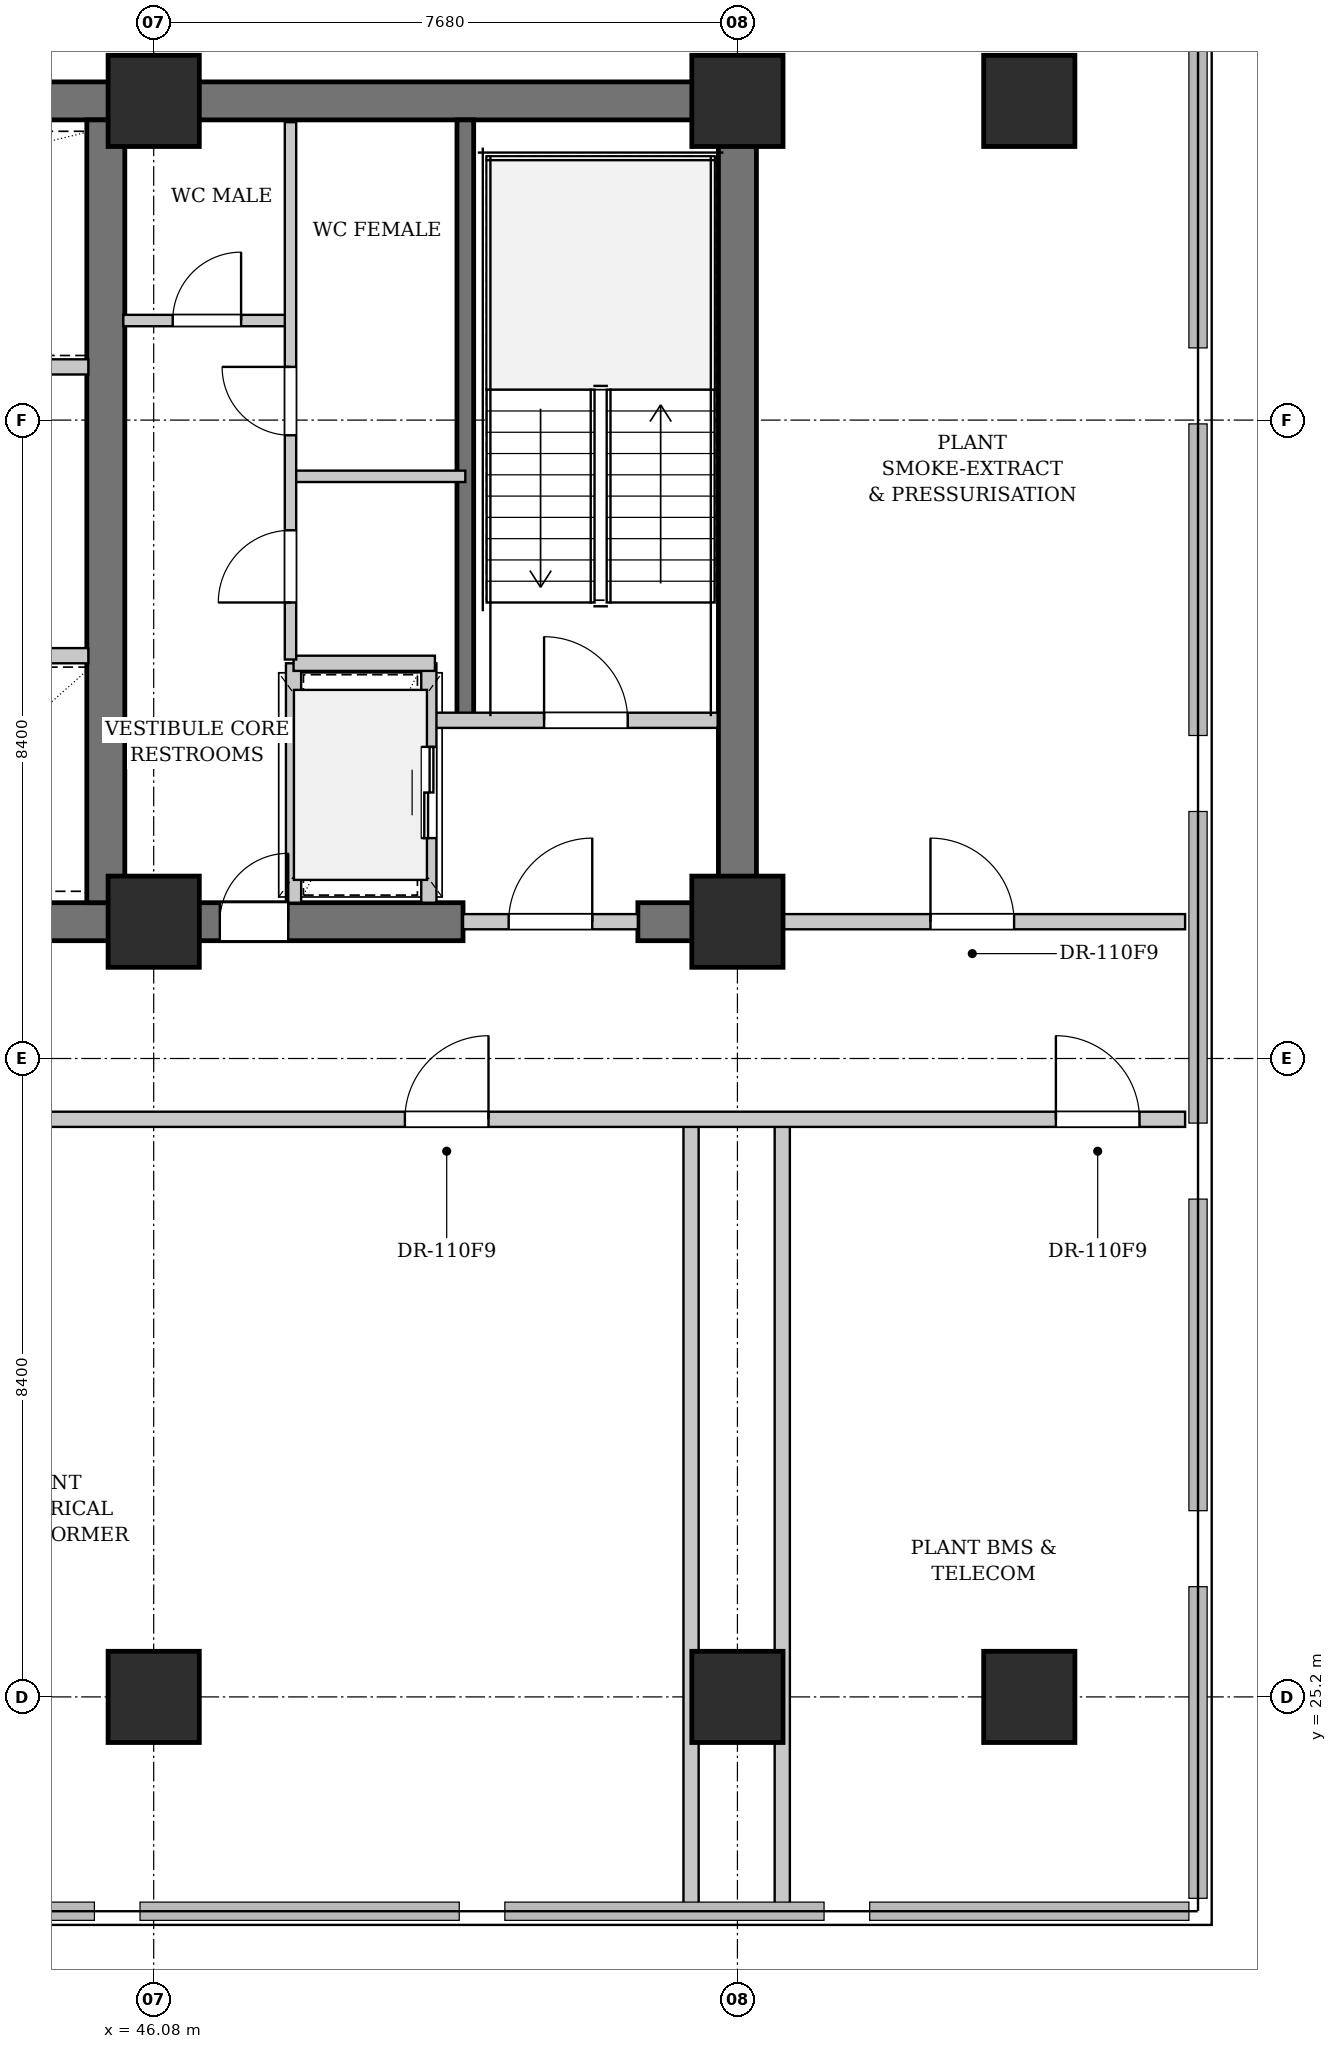
"""IFC4 building model, lengths in metres.
Left out: names, types, materials, properties, quantities, classifications, styles, units other than length and angle.
Written with IfcOpenShell. Run it as: python <this file> out.ifc"""

import sys

from ifc_helpers import new_model, si_unit, direction, frame, frame_2d, origin, origin_2d, place, context, subcontext, project, spatial, rectangle, extrude, element, fill, save


model = new_model("IFC4")
c1 = context("Model", 3, precision=1e-05, world=origin(), true_north=direction((0.0, 1.0)))
c2 = subcontext(c1, "Body", "Model", "MODEL_VIEW")
j1 = project(units=[si_unit("LENGTHUNIT", "METRE"), si_unit("PLANEANGLEUNIT", "RADIAN")], contexts=[c1])
p1 = place(None, origin())
s1 = spatial("IfcSite", under=j1, at=p1, CompositionType="ELEMENT")
p2 = place(p1, origin())
s2 = spatial("IfcBuilding", under=s1, at=p2, CompositionType="ELEMENT")
p3 = place(p2, frame((0.0, 0.0, 81.9)))
s3 = spatial("IfcBuildingStorey", under=s2, at=p3, CompositionType="ELEMENT", Elevation=81.9)
p4 = place(p3, frame((22.79, 46.2, 0.0), z_axis=(0.0, 0.0, 1.0), x_axis=(1.0, 0.0, 0.0)))
e1 = element("IfcWall", 1, at=p4, inside=s3, PredefinedType="SHEAR", context=c2, shape_type="SweptSolid", body=[
    extrude(rectangle(XDim=31.22, YDim=0.5, at=frame_2d((15.61, 0.0))), origin(), (0.0, 0.0, 1.0), 3.48),
])
p5 = place(p3, frame((42.1, 35.4, 0.0), z_axis=(0.0, 0.0, 1.0), x_axis=(1.0, 0.0, 0.0)))
e2 = element("IfcWall", 2, at=p5, inside=s3, PredefinedType="SHEAR", context=c2, shape_type="SweptSolid", body=[
    extrude(rectangle(XDim=8.05, YDim=0.5, at=frame_2d((4.025, 0.0))), origin(), (0.0, 0.0, 1.0), 3.48),
])
p6 = place(p5, frame((4.85, 0.0, 0.0)))
e3 = element("IfcOpeningElement", 3, at=p6, cuts=e2, PredefinedType="OPENING", context=c2, shape_type="SweptSolid", body=[
    extrude(rectangle(XDim=0.9, YDim=2.15, at=frame_2d((0.45, 1.075))), frame((0.0, 0.26, 0.0), z_axis=(0.0, -1.0, 0.0), x_axis=(1.0, 0.0, 0.0)), (0.0, 0.0, 1.0), 0.52),
])
p7 = place(p3, frame((52.45, 35.4, 0.0), z_axis=(0.0, 0.0, 1.0), x_axis=(1.0, 0.0, 0.0)))
e4 = element("IfcWall", 4, at=p7, inside=s3, PredefinedType="SHEAR", context=c2, shape_type="SweptSolid", body=[
    extrude(rectangle(XDim=1.56, YDim=0.5, at=frame_2d((0.78, 0.0))), origin(), (0.0, 0.0, 1.0), 3.48),
])
for number, where, z_axis, x_axis in (
    (5, (45.45, 35.65, 0.0), (0.0, 0.0, 1.0), (0.0, 1.0, 0.0)),
    (6, (53.76, 35.65, 0.0), (0.0, 0.0, 1.0), (0.0, 1.0, 0.0)),
):
    element("IfcWall", number, at=place(p3, frame(where, z_axis=z_axis, x_axis=x_axis)), inside=s3, PredefinedType="SHEAR", context=c2, shape_type="SweptSolid", body=[
        extrude(rectangle(XDim=10.3, YDim=0.5, at=frame_2d((5.15, 0.0))), origin(), (0.0, 0.0, 1.0), 3.48),
    ])
p8 = place(p3, frame((50.18, 38.05, 0.0), z_axis=(0.0, 0.0, 1.0), x_axis=(0.0, 1.0, 0.0)))
e7 = element("IfcWall", 7, at=p8, inside=s3, PredefinedType="SHEAR", context=c2, shape_type="SweptSolid", body=[
    extrude(rectangle(XDim=7.9, YDim=0.22, at=frame_2d((3.95, 0.0))), origin(), (0.0, 0.0, 1.0), 3.48),
])
for number, where, z_axis, x_axis in (
    (8, (46.08, 35.4, 0.0), (0.0, 0.0, 1.0), (1.0, 0.0, 0.0)),
    (9, (46.08, 46.2, 0.0), (0.0, 0.0, 1.0), (1.0, 0.0, 0.0)),
    (10, (46.08, 25.2, 0.0), (0.0, 0.0, 1.0), (1.0, 0.0, 0.0)),
    (11, (53.76, 35.4, 0.0), (0.0, 0.0, 1.0), (1.0, 0.0, 0.0)),
    (12, (53.76, 46.2, 0.0), (0.0, 0.0, 1.0), (1.0, 0.0, 0.0)),
    (13, (53.76, 25.2, 0.0), (0.0, 0.0, 1.0), (1.0, 0.0, 0.0)),
    (14, (57.6, 25.2, 0.0), (0.0, 0.0, 1.0), (1.0, 0.0, 0.0)),
    (15, (57.6, 46.2, 0.0), (0.0, 0.0, 1.0), (1.0, 0.0, 0.0)),
):
    element("IfcColumn", number, at=place(p3, frame(where, z_axis=z_axis, x_axis=x_axis)), inside=s3, PredefinedType="COLUMN", context=c2, shape_type="SweptSolid", body=[
        extrude(rectangle(XDim=1.2, YDim=1.2, at=origin_2d()), origin(), (0.0, 0.0, 1.0), 3.9),
    ])
for number, where, z_axis, x_axis in (
    (16, (41.85, 38.9, 0.0), (0.0, 0.0, 1.0), (1.0, 0.0, 0.0)),
    (17, (41.85, 42.7, 0.0), (0.0, 0.0, 1.0), (1.0, 0.0, 0.0)),
):
    element("IfcWall", number, at=place(p3, frame(where, z_axis=z_axis, x_axis=x_axis)), inside=s3, PredefinedType="PARTITIONING", context=c2, shape_type="SweptSolid", body=[
        extrude(rectangle(XDim=3.37, YDim=0.2, at=frame_2d((1.685, 0.0))), origin(), (0.0, 0.0, 1.0), 3.48),
    ])
p9 = place(p3, frame((49.78, 38.05, 0.0), z_axis=(0.0, 0.0, 1.0), x_axis=(1.0, 0.0, 0.0)))
e18 = element("IfcWall", 18, at=p9, inside=s3, PredefinedType="PARTITIONING", context=c2, shape_type="SweptSolid", body=[
    extrude(rectangle(XDim=3.72, YDim=0.2, at=frame_2d((1.86, 0.0))), origin(), (0.0, 0.0, 1.0), 3.48),
])
p10 = place(p9, frame((1.436, 0.0, 0.0)))
e19 = element("IfcOpeningElement", 19, at=p10, cuts=e18, PredefinedType="OPENING", context=c2, shape_type="SweptSolid", body=[
    extrude(rectangle(XDim=1.1, YDim=2.15, at=frame_2d((0.55, 1.075))), frame((0.0, 0.11, 0.0), z_axis=(0.0, -1.0, 0.0), x_axis=(1.0, 0.0, 0.0)), (0.0, 0.0, 1.0), 0.22),
])
p11 = place(p3, frame((50.15, 35.4, 0.0), z_axis=(0.0, 0.0, 1.0), x_axis=(1.0, 0.0, 0.0)))
e20 = element("IfcWall", 20, at=p11, inside=s3, PredefinedType="PARTITIONING", context=c2, shape_type="SweptSolid", body=[
    extrude(rectangle(XDim=2.3, YDim=0.2, at=frame_2d((1.15, 0.0))), origin(), (0.0, 0.0, 1.0), 2.565),
])
p12 = place(p11, frame((0.6, 0.0, 0.0)))
e21 = element("IfcOpeningElement", 21, at=p12, cuts=e20, PredefinedType="OPENING", context=c2, shape_type="SweptSolid", body=[
    extrude(rectangle(XDim=1.1, YDim=2.15, at=frame_2d((0.55, 1.075))), frame((0.0, 0.11, 0.0), z_axis=(0.0, -1.0, 0.0), x_axis=(1.0, 0.0, 0.0)), (0.0, 0.0, 1.0), 0.22),
])
p13 = place(p3, frame((49.7, 35.65, 0.0), z_axis=(0.0, 0.0, 1.0), x_axis=(0.0, 1.0, 0.0)))
e22 = element("IfcWall", 22, at=p13, inside=s3, PredefinedType="PARTITIONING", context=c2, shape_type="SweptSolid", body=[
    extrude(rectangle(XDim=3.15, YDim=0.2, at=frame_2d((1.575, 0.0))), origin(), (0.0, 0.0, 1.0), 3.48),
])
p14 = place(p13, frame((0.85, 0.0, 0.0)))
e23 = element("IfcOpeningElement", 23, at=p14, cuts=e22, PredefinedType="OPENING", context=c2, shape_type="SweptSolid", body=[
    extrude(rectangle(XDim=1.2, YDim=2.2, at=frame_2d((0.6, 1.1))), frame((0.0, 0.11, 0.0), z_axis=(0.0, -1.0, 0.0), x_axis=(1.0, 0.0, 0.0)), (0.0, 0.0, 1.0), 0.22),
])
p15 = place(p3, frame((47.92, 35.65, 0.0), z_axis=(0.0, 0.0, 1.0), x_axis=(0.0, 1.0, 0.0)))
e24 = element("IfcWall", 24, at=p15, inside=s3, PredefinedType="PARTITIONING", context=c2, shape_type="SweptSolid", body=[
    extrude(rectangle(XDim=3.15, YDim=0.2, at=frame_2d((1.575, 0.0))), origin(), (0.0, 0.0, 1.0), 3.48),
])
p16 = place(p3, frame((47.92, 38.8, 0.0), z_axis=(0.0, 0.0, 1.0), x_axis=(1.0, 0.0, 0.0)))
e25 = element("IfcWall", 25, at=p16, inside=s3, PredefinedType="PARTITIONING", context=c2, shape_type="SweptSolid", body=[
    extrude(rectangle(XDim=1.86, YDim=0.2, at=frame_2d((0.93, 0.0))), origin(), (0.0, 0.0, 1.0), 3.48),
])
p17 = place(p3, frame((45.68, 43.31, 0.0), z_axis=(0.0, 0.0, 1.0), x_axis=(1.0, 0.0, 0.0)))
e26 = element("IfcWall", 26, at=p17, inside=s3, PredefinedType="PARTITIONING", context=c2, shape_type="SweptSolid", body=[
    extrude(rectangle(XDim=2.2, YDim=0.15, at=frame_2d((1.1, 0.0))), origin(), (0.0, 0.0, 1.0), 3.48),
])
p18 = place(p17, frame((0.65, 0.0, 0.0)))
e27 = element("IfcOpeningElement", 27, at=p18, cuts=e26, PredefinedType="OPENING", context=c2, shape_type="SweptSolid", body=[
    extrude(rectangle(XDim=0.9, YDim=2.15, at=frame_2d((0.45, 1.075))), frame((0.0, 0.085, 0.0), z_axis=(0.0, -1.0, 0.0), x_axis=(1.0, 0.0, 0.0)), (0.0, 0.0, 1.0), 0.17),
])
p19 = place(p3, frame((47.88, 41.26, 0.0), z_axis=(0.0, 0.0, 1.0), x_axis=(1.0, 0.0, 0.0)))
e28 = element("IfcWall", 28, at=p19, inside=s3, PredefinedType="PARTITIONING", context=c2, shape_type="SweptSolid", body=[
    extrude(rectangle(XDim=2.3, YDim=0.15, at=frame_2d((1.15, 0.0))), origin(), (0.0, 0.0, 1.0), 3.48),
])
p20 = place(p3, frame((47.88, 38.85, 0.0), z_axis=(0.0, 0.0, 1.0), x_axis=(0.0, 1.0, 0.0)))
e29 = element("IfcWall", 29, at=p20, inside=s3, PredefinedType="PARTITIONING", context=c2, shape_type="SweptSolid", body=[
    extrude(rectangle(XDim=7.07, YDim=0.15, at=frame_2d((3.535, 0.0))), origin(), (0.0, 0.0, 1.0), 3.48),
])
p21 = place(p20, frame((0.75, 0.0, 0.0)))
e30 = element("IfcOpeningElement", 30, at=p21, cuts=e29, PredefinedType="OPENING", context=c2, shape_type="SweptSolid", body=[
    extrude(rectangle(XDim=0.95, YDim=2.15, at=frame_2d((0.475, 1.075))), frame((0.0, 0.085, 0.0), z_axis=(0.0, -1.0, 0.0), x_axis=(1.0, 0.0, 0.0)), (0.0, 0.0, 1.0), 0.17),
])
p22 = place(p20, frame((2.95, 0.0, 0.0)))
e31 = element("IfcOpeningElement", 31, at=p22, cuts=e29, PredefinedType="OPENING", context=c2, shape_type="SweptSolid", body=[
    extrude(rectangle(XDim=0.9, YDim=2.15, at=frame_2d((0.45, 1.075))), frame((0.0, 0.085, 0.0), z_axis=(0.0, -1.0, 0.0), x_axis=(1.0, 0.0, 0.0)), (0.0, 0.0, 1.0), 0.17),
])
p23 = place(p3, frame((54.05, 35.4, 0.0), z_axis=(0.0, 0.0, 1.0), x_axis=(1.0, 0.0, 0.0)))
e32 = element("IfcWall", 32, at=p23, inside=s3, PredefinedType="PARTITIONING", context=c2, shape_type="SweptSolid", body=[
    extrude(rectangle(XDim=5.6, YDim=0.2, at=frame_2d((2.8, 0.0))), origin(), (0.0, 0.0, 1.0), 3.48),
])
p24 = place(p23, frame((2.25, 0.0, 0.0)))
e33 = element("IfcOpeningElement", 33, at=p24, cuts=e32, PredefinedType="OPENING", context=c2, shape_type="SweptSolid", body=[
    extrude(rectangle(XDim=1.1, YDim=2.15, at=frame_2d((0.55, 1.075))), frame((0.0, 0.11, 0.0), z_axis=(0.0, -1.0, 0.0), x_axis=(1.0, 0.0, 0.0)), (0.0, 0.0, 1.0), 0.22),
])
for number, where, z_axis, x_axis in (
    (34, (53.15, 22.38, 0.0), (0.0, 0.0, 1.0), (0.0, 1.0, 0.0)),
    (35, (54.35, 22.38, 0.0), (0.0, 0.0, 1.0), (0.0, 1.0, 0.0)),
):
    element("IfcWall", number, at=place(p3, frame(where, z_axis=z_axis, x_axis=x_axis)), inside=s3, PredefinedType="PARTITIONING", context=c2, shape_type="SweptSolid", body=[
        extrude(rectangle(XDim=10.42, YDim=0.2, at=frame_2d((5.21, 0.0))), origin(), (0.0, 0.0, 1.0), 3.48),
    ])
p25 = place(p3, frame((17.15, 32.8, 0.0), z_axis=(0.0, 0.0, 1.0), x_axis=(1.0, 0.0, 0.0)))
e36 = element("IfcWall", 36, at=p25, inside=s3, PredefinedType="PARTITIONING", context=c2, shape_type="SweptSolid", body=[
    extrude(rectangle(XDim=42.5, YDim=0.2, at=frame_2d((21.25, 0.0))), origin(), (0.0, 0.0, 1.0), 3.48),
])
p26 = place(p25, frame((0.6, 0.0, 0.0)))
e37 = element("IfcOpeningElement", 37, at=p26, cuts=e36, PredefinedType="OPENING", context=c2, shape_type="SweptSolid", body=[
    extrude(rectangle(XDim=1.1, YDim=2.15, at=frame_2d((0.55, 1.075))), frame((0.0, 0.11, 0.0), z_axis=(0.0, -1.0, 0.0), x_axis=(1.0, 0.0, 0.0)), (0.0, 0.0, 1.0), 0.22),
])
p27 = place(p25, frame((16.862, 0.0, 0.0)))
e38 = element("IfcOpeningElement", 38, at=p27, cuts=e36, PredefinedType="OPENING", context=c2, shape_type="SweptSolid", body=[
    extrude(rectangle(XDim=1.1, YDim=2.15, at=frame_2d((0.55, 1.075))), frame((0.0, 0.11, 0.0), z_axis=(0.0, -1.0, 0.0), x_axis=(1.0, 0.0, 0.0)), (0.0, 0.0, 1.0), 0.22),
])
p28 = place(p25, frame((32.235, 0.0, 0.0)))
e39 = element("IfcOpeningElement", 39, at=p28, cuts=e36, PredefinedType="OPENING", context=c2, shape_type="SweptSolid", body=[
    extrude(rectangle(XDim=1.1, YDim=2.15, at=frame_2d((0.55, 1.075))), frame((0.0, 0.11, 0.0), z_axis=(0.0, -1.0, 0.0), x_axis=(1.0, 0.0, 0.0)), (0.0, 0.0, 1.0), 0.22),
])
p29 = place(p25, frame((40.8, 0.0, 0.0)))
e40 = element("IfcOpeningElement", 40, at=p29, cuts=e36, PredefinedType="OPENING", context=c2, shape_type="SweptSolid", body=[
    extrude(rectangle(XDim=1.1, YDim=2.15, at=frame_2d((0.55, 1.075))), frame((0.0, 0.11, 0.0), z_axis=(0.0, -1.0, 0.0), x_axis=(1.0, 0.0, 0.0)), (0.0, 0.0, 1.0), 0.22),
])
p30 = place(p10, origin())
e41 = element("IfcDoor", 41, at=p30, inside=s3, OperationType="SINGLE_SWING_LEFT", PredefinedType="DOOR", context=c2, shape_type="SweptSolid", body=[
    extrude(rectangle(XDim=1.1, YDim=2.15, at=frame_2d((0.55, 1.075))), frame((0.0, 0.025, 0.0), z_axis=(0.0, -1.0, 0.0), x_axis=(1.0, 0.0, 0.0)), (0.0, 0.0, 1.0), 0.05),
])
fill(e19, e41)
p31 = place(p12, origin())
e42 = element("IfcDoor", 42, at=p31, inside=s3, OperationType="SINGLE_SWING_RIGHT", PredefinedType="DOOR", context=c2, shape_type="SweptSolid", body=[
    extrude(rectangle(XDim=1.1, YDim=2.15, at=frame_2d((0.55, 1.075))), frame((0.0, 0.025, 0.0), z_axis=(0.0, -1.0, 0.0), x_axis=(1.0, 0.0, 0.0)), (0.0, 0.0, 1.0), 0.05),
])
fill(e21, e42)
p32 = place(p14, origin())
e43 = element("IfcDoor", 43, at=p32, inside=s3, OperationType="DOUBLE_DOOR_SLIDING", PredefinedType="DOOR", context=c2, shape_type="SweptSolid", body=[
    extrude(rectangle(XDim=1.2, YDim=2.2, at=frame_2d((0.6, 1.1))), frame((0.0, 0.025, 0.0), z_axis=(0.0, -1.0, 0.0), x_axis=(1.0, 0.0, 0.0)), (0.0, 0.0, 1.0), 0.05),
])
fill(e23, e43)
p33 = place(p18, origin())
e44 = element("IfcDoor", 44, at=p33, inside=s3, OperationType="SINGLE_SWING_RIGHT", PredefinedType="DOOR", context=c2, shape_type="SweptSolid", body=[
    extrude(rectangle(XDim=0.9, YDim=2.15, at=frame_2d((0.45, 1.075))), frame((0.0, 0.025, 0.0), z_axis=(0.0, -1.0, 0.0), x_axis=(1.0, 0.0, 0.0)), (0.0, 0.0, 1.0), 0.05),
])
fill(e27, e44)
p34 = place(p21, origin())
e45 = element("IfcDoor", 45, at=p34, inside=s3, OperationType="SINGLE_SWING_LEFT", PredefinedType="DOOR", context=c2, shape_type="SweptSolid", body=[
    extrude(rectangle(XDim=0.95, YDim=2.15, at=frame_2d((0.475, 1.075))), frame((0.0, 0.025, 0.0), z_axis=(0.0, -1.0, 0.0), x_axis=(1.0, 0.0, 0.0)), (0.0, 0.0, 1.0), 0.05),
])
fill(e30, e45)
p35 = place(p22, origin())
e46 = element("IfcDoor", 46, at=p35, inside=s3, OperationType="SINGLE_SWING_RIGHT", PredefinedType="DOOR", context=c2, shape_type="SweptSolid", body=[
    extrude(rectangle(XDim=0.9, YDim=2.15, at=frame_2d((0.45, 1.075))), frame((0.0, 0.025, 0.0), z_axis=(0.0, -1.0, 0.0), x_axis=(1.0, 0.0, 0.0)), (0.0, 0.0, 1.0), 0.05),
])
fill(e31, e46)
p36 = place(p24, origin())
e47 = element("IfcDoor", 47, at=p36, inside=s3, OperationType="SINGLE_SWING_LEFT", PredefinedType="DOOR", context=c2, shape_type="SweptSolid", body=[
    extrude(rectangle(XDim=1.1, YDim=2.15, at=frame_2d((0.55, 1.075))), frame((0.0, 0.025, 0.0), z_axis=(0.0, -1.0, 0.0), x_axis=(1.0, 0.0, 0.0)), (0.0, 0.0, 1.0), 0.05),
])
fill(e33, e47)
p37 = place(p28, origin())
e48 = element("IfcDoor", 48, at=p37, inside=s3, OperationType="SINGLE_SWING_RIGHT", PredefinedType="DOOR", context=c2, shape_type="SweptSolid", body=[
    extrude(rectangle(XDim=1.1, YDim=2.15, at=frame_2d((0.55, 1.075))), frame((0.0, 0.025, 0.0), z_axis=(0.0, -1.0, 0.0), x_axis=(1.0, 0.0, 0.0)), (0.0, 0.0, 1.0), 0.05),
])
fill(e39, e48)
p38 = place(p29, origin())
e49 = element("IfcDoor", 49, at=p38, inside=s3, OperationType="SINGLE_SWING_LEFT", PredefinedType="DOOR", context=c2, shape_type="SweptSolid", body=[
    extrude(rectangle(XDim=1.1, YDim=2.15, at=frame_2d((0.55, 1.075))), frame((0.0, 0.025, 0.0), z_axis=(0.0, -1.0, 0.0), x_axis=(1.0, 0.0, 0.0)), (0.0, 0.0, 1.0), 0.05),
])
fill(e40, e49)
p39 = place(p6, origin())
e50 = element("IfcDoor", 50, at=p39, inside=s3, OperationType="SINGLE_SWING_RIGHT", PredefinedType="DOOR", context=c2, shape_type="SweptSolid", body=[
    extrude(rectangle(XDim=0.9, YDim=2.15, at=frame_2d((0.45, 1.075))), frame((0.0, 0.025, 0.0), z_axis=(0.0, -1.0, 0.0), x_axis=(1.0, 0.0, 0.0)), (0.0, 0.0, 1.0), 0.05),
])
fill(e3, e50)
save(model, sys.argv[1])
